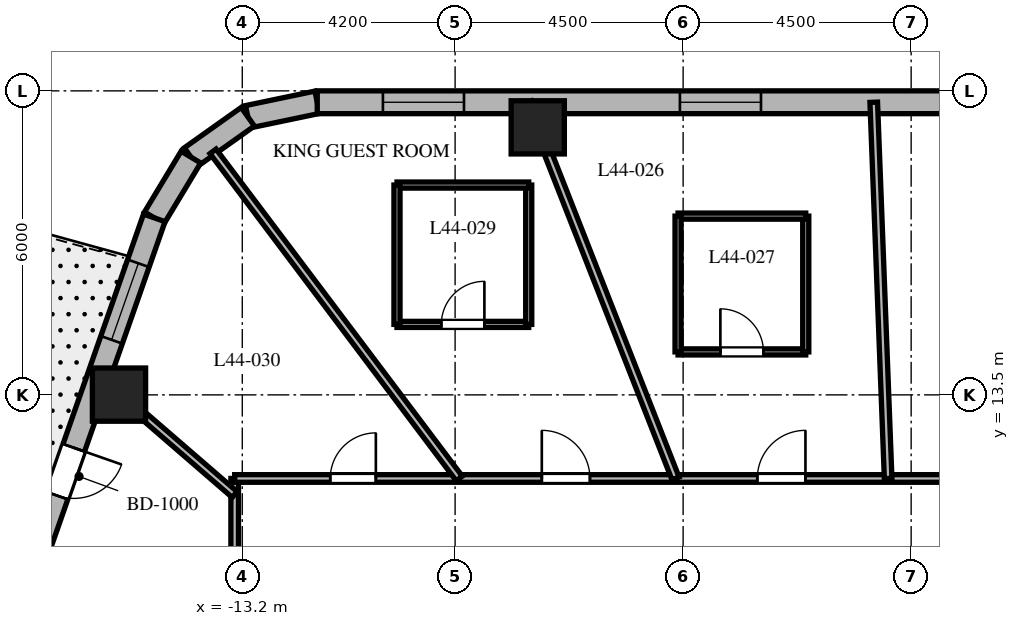
"""IFC4 building model, lengths in metres.
Left out: names, types, materials, properties, quantities, classifications, styles, units other than length and angle.
Written with IfcOpenShell. Run it as: python <this file> out.ifc"""

import sys

from ifc_helpers import new_model, si_unit, direction, frame, frame_2d, origin, origin_2d, place, context, subcontext, project, spatial, rectangle, extrude, element, fill, save


model = new_model("IFC4")
c1 = context("Model", 3, precision=1e-05, world=origin(), true_north=direction((0.0, 1.0)))
c2 = subcontext(c1, "Body", "Model", "MODEL_VIEW")
j1 = project(units=[si_unit("LENGTHUNIT", "METRE"), si_unit("PLANEANGLEUNIT", "RADIAN")], contexts=[c1])
p1 = place(None, origin())
s1 = spatial("IfcSite", under=j1, at=p1, CompositionType="ELEMENT")
p2 = place(p1, origin())
s2 = spatial("IfcBuilding", under=s1, at=p2, CompositionType="ELEMENT")
p3 = place(p2, frame((0.0, 0.0, 179.3)))
s3 = spatial("IfcBuildingStorey", under=s2, at=p3, CompositionType="ELEMENT", Elevation=179.3)
for number, where, z_axis, x_axis in (
    (1, (-7.369, 18.78, 0.0), (0.0, 0.0, 1.0), (1.0, 0.0, 0.0)),
    (2, (-15.633, 13.505, 0.0), (0.0, 0.0, 1.0), (1.0, 0.0, 0.0)),
):
    element("IfcColumn", number, at=place(p3, frame(where, z_axis=z_axis, x_axis=x_axis)), inside=s3, PredefinedType="COLUMN", context=c2, shape_type="SweptSolid", body=[
        extrude(rectangle(XDim=1.05, YDim=1.05, at=origin_2d()), origin(), (0.0, 0.0, 1.0), 3.7),
    ])
p4 = place(p3, frame((-11.72, 19.275, 0.0), z_axis=(0.0, 0.0, 1.0), x_axis=(-0.97893106758, -0.204191001093, 0.0)))
e3 = element("IfcWall", 3, at=p4, inside=s3, PredefinedType="SOLIDWALL", context=c2, shape_type="SweptSolid", body=[
    extrude(rectangle(XDim=1.4, YDim=0.45, at=frame_2d((0.7, 0.0))), origin(), (0.0, 0.0, 1.0), 3.4),
])
p5 = place(p3, frame((-13.091, 18.989, 0.0), z_axis=(0.0, 0.0, 1.0), x_axis=(-0.815574637848, -0.578651890258, 0.0)))
e4 = element("IfcWall", 4, at=p5, inside=s3, PredefinedType="SOLIDWALL", context=c2, shape_type="SweptSolid", body=[
    extrude(rectangle(XDim=1.377, YDim=0.45, at=frame_2d((0.688, 0.0))), origin(), (0.0, 0.0, 1.0), 3.4),
])
p6 = place(p3, frame((-14.214, 18.192, 0.0), z_axis=(0.0, 0.0, 1.0), x_axis=(-0.516340945502, -0.856383108193, 0.0)))
e5 = element("IfcWall", 5, at=p6, inside=s3, PredefinedType="SOLIDWALL", context=c2, shape_type="SweptSolid", body=[
    extrude(rectangle(XDim=1.4, YDim=0.45, at=frame_2d((0.7, 0.0))), origin(), (0.0, 0.0, 1.0), 3.4),
])
p7 = place(p3, frame((10.108, 19.275, 0.0), z_axis=(0.0, 0.0, 1.0), x_axis=(-1.0, 0.0, 0.0)))
e6 = element("IfcWall", 6, at=p7, inside=s3, PredefinedType="SOLIDWALL", context=c2, shape_type="SweptSolid", body=[
    extrude(rectangle(XDim=21.829, YDim=0.45, at=frame_2d((10.915, 0.0))), origin(), (0.0, 0.0, 1.0), 3.4),
])
p8 = place(p7, frame((1.297, 0.0, 0.8)))
e7 = element("IfcOpeningElement", 7, at=p8, cuts=e6, PredefinedType="OPENING", context=c2, shape_type="SweptSolid", body=[
    extrude(rectangle(XDim=1.6, YDim=1.75, at=frame_2d((0.8, 0.875))), frame((0.0, 0.235, 0.0), z_axis=(0.0, -1.0, 0.0), x_axis=(1.0, 0.0, 0.0)), (0.0, 0.0, 1.0), 0.47),
])
p9 = place(p7, frame((7.09, 0.0, 0.8)))
e8 = element("IfcOpeningElement", 8, at=p9, cuts=e6, PredefinedType="OPENING", context=c2, shape_type="SweptSolid", body=[
    extrude(rectangle(XDim=1.6, YDim=1.75, at=frame_2d((0.8, 0.875))), frame((0.0, 0.235, 0.0), z_axis=(0.0, -1.0, 0.0), x_axis=(1.0, 0.0, 0.0)), (0.0, 0.0, 1.0), 0.47),
])
p10 = place(p7, frame((13.072, 0.0, 0.8)))
e9 = element("IfcOpeningElement", 9, at=p10, cuts=e6, PredefinedType="OPENING", context=c2, shape_type="SweptSolid", body=[
    extrude(rectangle(XDim=1.6, YDim=1.75, at=frame_2d((0.8, 0.875))), frame((0.0, 0.235, 0.0), z_axis=(0.0, -1.0, 0.0), x_axis=(1.0, 0.0, 0.0)), (0.0, 0.0, 1.0), 0.47),
])
p11 = place(p7, frame((18.933, 0.0, 0.8)))
e10 = element("IfcOpeningElement", 10, at=p11, cuts=e6, PredefinedType="OPENING", context=c2, shape_type="SweptSolid", body=[
    extrude(rectangle(XDim=1.6, YDim=1.75, at=frame_2d((0.8, 0.875))), frame((0.0, 0.235, 0.0), z_axis=(0.0, -1.0, 0.0), x_axis=(1.0, 0.0, 0.0)), (0.0, 0.0, 1.0), 0.47),
])
p12 = place(p3, frame((-14.937, 16.993, 0.0), z_axis=(0.0, 0.0, 1.0), x_axis=(-0.330431575061, -0.943829949834, 0.0)))
e11 = element("IfcWall", 11, at=p12, inside=s3, PredefinedType="SOLIDWALL", context=c2, shape_type="SweptSolid", body=[
    extrude(rectangle(XDim=17.689, YDim=0.45, at=frame_2d((8.844, 0.0))), origin(), (0.0, 0.0, 1.0), 3.4),
])
p13 = place(p12, frame((4.807, 0.0, 0.0)))
e12 = element("IfcOpeningElement", 12, at=p13, cuts=e11, PredefinedType="OPENING", context=c2, shape_type="SweptSolid", body=[
    extrude(rectangle(XDim=1.0, YDim=2.15, at=frame_2d((0.5, 1.075))), frame((0.0, 0.235, 0.0), z_axis=(0.0, -1.0, 0.0), x_axis=(1.0, 0.0, 0.0)), (0.0, 0.0, 1.0), 0.47),
])
p14 = place(p12, frame((0.95, 0.0, 0.8)))
e13 = element("IfcOpeningElement", 13, at=p14, cuts=e11, PredefinedType="OPENING", context=c2, shape_type="SweptSolid", body=[
    extrude(rectangle(XDim=1.6, YDim=1.75, at=frame_2d((0.8, 0.875))), frame((0.0, 0.235, 0.0), z_axis=(0.0, -1.0, 0.0), x_axis=(1.0, 0.0, 0.0)), (0.0, 0.0, 1.0), 0.47),
])
p15 = place(p12, frame((7.99, 0.0, 0.8)))
e14 = element("IfcOpeningElement", 14, at=p15, cuts=e11, PredefinedType="OPENING", context=c2, shape_type="SweptSolid", body=[
    extrude(rectangle(XDim=1.6, YDim=1.75, at=frame_2d((0.8, 0.875))), frame((0.0, 0.235, 0.0), z_axis=(0.0, -1.0, 0.0), x_axis=(1.0, 0.0, 0.0)), (0.0, 0.0, 1.0), 0.47),
])
p16 = place(p12, frame((15.084, 0.0, 0.8)))
e15 = element("IfcOpeningElement", 15, at=p16, cuts=e11, PredefinedType="OPENING", context=c2, shape_type="SweptSolid", body=[
    extrude(rectangle(XDim=1.6, YDim=1.75, at=frame_2d((0.8, 0.875))), frame((0.0, 0.235, 0.0), z_axis=(0.0, -1.0, 0.0), x_axis=(1.0, 0.0, 0.0)), (0.0, 0.0, 1.0), 0.47),
])
p17 = place(p3, frame((-13.35, -11.85, 0.0), z_axis=(0.0, 0.0, 1.0), x_axis=(0.0, 1.0, 0.0)))
e16 = element("IfcWall", 16, at=p17, inside=s3, PredefinedType="PARTITIONING", context=c2, shape_type="SweptSolid", body=[
    extrude(rectangle(XDim=23.7, YDim=0.15, at=frame_2d((11.85, 0.0))), origin(), (0.0, 0.0, 1.0), 2.84),
])
p18 = place(p17, frame((18.389, 0.0, 0.0)))
e17 = element("IfcOpeningElement", 17, at=p18, cuts=e16, PredefinedType="OPENING", context=c2, shape_type="SweptSolid", body=[
    extrude(rectangle(XDim=0.95, YDim=2.03, at=frame_2d((0.475, 1.015))), frame((0.0, 0.085, 0.0), z_axis=(0.0, -1.0, 0.0), x_axis=(1.0, 0.0, 0.0)), (0.0, 0.0, 1.0), 0.17),
])
p19 = place(p17, frame((12.315, 0.0, 0.0)))
e18 = element("IfcOpeningElement", 18, at=p19, cuts=e16, PredefinedType="OPENING", context=c2, shape_type="SweptSolid", body=[
    extrude(rectangle(XDim=0.9, YDim=2.03, at=frame_2d((0.45, 1.015))), frame((0.0, 0.085, 0.0), z_axis=(0.0, -1.0, 0.0), x_axis=(1.0, 0.0, 0.0)), (0.0, 0.0, 1.0), 0.17),
])
p20 = place(p17, frame((9.27, 0.0, 0.0)))
e19 = element("IfcOpeningElement", 19, at=p20, cuts=e16, PredefinedType="OPENING", context=c2, shape_type="SweptSolid", body=[
    extrude(rectangle(XDim=0.9, YDim=2.03, at=frame_2d((0.45, 1.015))), frame((0.0, 0.085, 0.0), z_axis=(0.0, -1.0, 0.0), x_axis=(1.0, 0.0, 0.0)), (0.0, 0.0, 1.0), 0.17),
])
p21 = place(p17, frame((3.765, 0.0, 0.0)))
e20 = element("IfcOpeningElement", 20, at=p21, cuts=e16, PredefinedType="OPENING", context=c2, shape_type="SweptSolid", body=[
    extrude(rectangle(XDim=0.9, YDim=2.03, at=frame_2d((0.45, 1.015))), frame((0.0, 0.085, 0.0), z_axis=(0.0, -1.0, 0.0), x_axis=(1.0, 0.0, 0.0)), (0.0, 0.0, 1.0), 0.17),
])
p22 = place(p3, frame((-13.35, 11.85, 0.0), z_axis=(0.0, 0.0, 1.0), x_axis=(1.0, 0.0, 0.0)))
e21 = element("IfcWall", 21, at=p22, inside=s3, PredefinedType="PARTITIONING", context=c2, shape_type="SweptSolid", body=[
    extrude(rectangle(XDim=26.7, YDim=0.15, at=frame_2d((13.35, 0.0))), origin(), (0.0, 0.0, 1.0), 2.84),
])
p23 = place(p22, frame((22.7, 0.0, 0.0)))
e22 = element("IfcOpeningElement", 22, at=p23, cuts=e21, PredefinedType="OPENING", context=c2, shape_type="SweptSolid", body=[
    extrude(rectangle(XDim=0.9, YDim=2.03, at=frame_2d((0.45, 1.015))), frame((0.0, 0.085, 0.0), z_axis=(0.0, -1.0, 0.0), x_axis=(1.0, 0.0, 0.0)), (0.0, 0.0, 1.0), 0.17),
])
p24 = place(p22, frame((18.523, 0.0, 0.0)))
e23 = element("IfcOpeningElement", 23, at=p24, cuts=e21, PredefinedType="OPENING", context=c2, shape_type="SweptSolid", body=[
    extrude(rectangle(XDim=0.95, YDim=2.03, at=frame_2d((0.475, 1.015))), frame((0.0, 0.085, 0.0), z_axis=(0.0, -1.0, 0.0), x_axis=(1.0, 0.0, 0.0)), (0.0, 0.0, 1.0), 0.17),
])
p25 = place(p22, frame((14.469, 0.0, 0.0)))
e24 = element("IfcOpeningElement", 24, at=p25, cuts=e21, PredefinedType="OPENING", context=c2, shape_type="SweptSolid", body=[
    extrude(rectangle(XDim=0.95, YDim=2.03, at=frame_2d((0.475, 1.015))), frame((0.0, 0.085, 0.0), z_axis=(0.0, -1.0, 0.0), x_axis=(1.0, 0.0, 0.0)), (0.0, 0.0, 1.0), 0.17),
])
p26 = place(p22, frame((10.314, 0.0, 0.0)))
e25 = element("IfcOpeningElement", 25, at=p26, cuts=e21, PredefinedType="OPENING", context=c2, shape_type="SweptSolid", body=[
    extrude(rectangle(XDim=0.95, YDim=2.03, at=frame_2d((0.475, 1.015))), frame((0.0, 0.085, 0.0), z_axis=(0.0, -1.0, 0.0), x_axis=(1.0, 0.0, 0.0)), (0.0, 0.0, 1.0), 0.17),
])
p27 = place(p22, frame((6.061, 0.0, 0.0)))
e26 = element("IfcOpeningElement", 26, at=p27, cuts=e21, PredefinedType="OPENING", context=c2, shape_type="SweptSolid", body=[
    extrude(rectangle(XDim=0.95, YDim=2.03, at=frame_2d((0.475, 1.015))), frame((0.0, 0.085, 0.0), z_axis=(0.0, -1.0, 0.0), x_axis=(1.0, 0.0, 0.0)), (0.0, 0.0, 1.0), 0.17),
])
p28 = place(p22, frame((1.886, 0.0, 0.0)))
e27 = element("IfcOpeningElement", 27, at=p28, cuts=e21, PredefinedType="OPENING", context=c2, shape_type="SweptSolid", body=[
    extrude(rectangle(XDim=0.9, YDim=2.03, at=frame_2d((0.45, 1.015))), frame((0.0, 0.085, 0.0), z_axis=(0.0, -1.0, 0.0), x_axis=(1.0, 0.0, 0.0)), (0.0, 0.0, 1.0), 0.17),
])
p29 = place(p3, frame((-0.454, 11.85, 0.0), z_axis=(0.0, 0.0, 1.0), x_axis=(-0.038279171143, 0.999267083945, 0.0)))
e28 = element("IfcWall", 28, at=p29, inside=s3, PredefinedType="PARTITIONING", context=c2, shape_type="SweptSolid", body=[
    extrude(rectangle(XDim=7.43, YDim=0.15, at=frame_2d((3.715, 0.0))), origin(), (0.0, 0.0, 1.0), 2.64),
])
p30 = place(p3, frame((-4.65, 11.85, 0.0), z_axis=(0.0, 0.0, 1.0), x_axis=(-0.365265947993, 0.930903210456, 0.0)))
e29 = element("IfcWall", 29, at=p30, inside=s3, PredefinedType="PARTITIONING", context=c2, shape_type="SweptSolid", body=[
    extrude(rectangle(XDim=7.976, YDim=0.15, at=frame_2d((3.988, 0.0))), origin(), (0.0, 0.0, 1.0), 2.64),
])
p31 = place(p3, frame((-8.918, 11.85, 0.0), z_axis=(0.0, 0.0, 1.0), x_axis=(-0.601347965064, 0.798987249531, 0.0)))
e30 = element("IfcWall", 30, at=p31, inside=s3, PredefinedType="PARTITIONING", context=c2, shape_type="SweptSolid", body=[
    extrude(rectangle(XDim=8.08, YDim=0.15, at=frame_2d((4.04, 0.0))), origin(), (0.0, 0.0, 1.0), 2.64),
])
p32 = place(p3, frame((-13.35, 11.533, 0.0), z_axis=(0.0, 0.0, 1.0), x_axis=(-0.756711647314, 0.65374879183, 0.0)))
e31 = element("IfcWall", 31, at=p32, inside=s3, PredefinedType="PARTITIONING", context=c2, shape_type="SweptSolid", body=[
    extrude(rectangle(XDim=3.55, YDim=0.15, at=frame_2d((1.775, 0.0))), origin(), (0.0, 0.0, 1.0), 2.64),
])
p33 = place(p3, frame((-4.6, 14.348, 0.0), z_axis=(0.0, 0.0, 1.0), x_axis=(1.0, 0.0, 0.0)))
e32 = element("IfcWall", 32, at=p33, inside=s3, PredefinedType="PARTITIONING", context=c2, shape_type="SweptSolid", body=[
    extrude(rectangle(XDim=2.52, YDim=0.12, at=frame_2d((1.26, 0.0))), origin(), (0.0, 0.0, 1.0), 3.4),
])
p34 = place(p33, frame((0.835, 0.0, 0.0)))
e33 = element("IfcOpeningElement", 33, at=p34, cuts=e32, PredefinedType="OPENING", context=c2, shape_type="SweptSolid", body=[
    extrude(rectangle(XDim=0.85, YDim=2.03, at=frame_2d((0.425, 1.015))), frame((0.0, 0.07, 0.0), z_axis=(0.0, -1.0, 0.0), x_axis=(1.0, 0.0, 0.0)), (0.0, 0.0, 1.0), 0.14),
])
p35 = place(p3, frame((-2.08, 14.348, 0.0), z_axis=(0.0, 0.0, 1.0), x_axis=(0.0, 1.0, 0.0)))
e34 = element("IfcWall", 34, at=p35, inside=s3, PredefinedType="PARTITIONING", context=c2, shape_type="SweptSolid", body=[
    extrude(rectangle(XDim=2.68, YDim=0.12, at=frame_2d((1.34, 0.0))), origin(), (0.0, 0.0, 1.0), 2.84),
])
p36 = place(p3, frame((-2.08, 17.028, 0.0), z_axis=(0.0, 0.0, 1.0), x_axis=(-1.0, 0.0, 0.0)))
e35 = element("IfcWall", 35, at=p36, inside=s3, PredefinedType="PARTITIONING", context=c2, shape_type="SweptSolid", body=[
    extrude(rectangle(XDim=2.52, YDim=0.12, at=frame_2d((1.26, 0.0))), origin(), (0.0, 0.0, 1.0), 3.4),
])
p37 = place(p3, frame((-4.6, 17.028, 0.0), z_axis=(0.0, 0.0, 1.0), x_axis=(0.0, -1.0, 0.0)))
e36 = element("IfcWall", 36, at=p37, inside=s3, PredefinedType="PARTITIONING", context=c2, shape_type="SweptSolid", body=[
    extrude(rectangle(XDim=2.68, YDim=0.12, at=frame_2d((1.34, 0.0))), origin(), (0.0, 0.0, 1.0), 2.84),
])
p38 = place(p3, frame((-10.147, 14.891, 0.0), z_axis=(0.0, 0.0, 1.0), x_axis=(1.0, 0.0, 0.0)))
e37 = element("IfcWall", 37, at=p38, inside=s3, PredefinedType="PARTITIONING", context=c2, shape_type="SweptSolid", body=[
    extrude(rectangle(XDim=2.6, YDim=0.12, at=frame_2d((1.3, 0.0))), origin(), (0.0, 0.0, 1.0), 2.84),
])
p39 = place(p38, frame((0.875, 0.0, 0.0)))
e38 = element("IfcOpeningElement", 38, at=p39, cuts=e37, PredefinedType="OPENING", context=c2, shape_type="SweptSolid", body=[
    extrude(rectangle(XDim=0.85, YDim=2.03, at=frame_2d((0.425, 1.015))), frame((0.0, 0.07, 0.0), z_axis=(0.0, -1.0, 0.0), x_axis=(1.0, 0.0, 0.0)), (0.0, 0.0, 1.0), 0.14),
])
p40 = place(p3, frame((-7.547, 14.891, 0.0), z_axis=(0.0, 0.0, 1.0), x_axis=(0.0, 1.0, 0.0)))
e39 = element("IfcWall", 39, at=p40, inside=s3, PredefinedType="PARTITIONING", context=c2, shape_type="SweptSolid", body=[
    extrude(rectangle(XDim=2.75, YDim=0.12, at=frame_2d((1.375, 0.0))), origin(), (0.0, 0.0, 1.0), 2.84),
])
p41 = place(p3, frame((-7.547, 17.641, 0.0), z_axis=(0.0, 0.0, 1.0), x_axis=(-1.0, 0.0, 0.0)))
e40 = element("IfcWall", 40, at=p41, inside=s3, PredefinedType="PARTITIONING", context=c2, shape_type="SweptSolid", body=[
    extrude(rectangle(XDim=2.6, YDim=0.12, at=frame_2d((1.3, 0.0))), origin(), (0.0, 0.0, 1.0), 2.64),
])
p42 = place(p3, frame((-10.147, 17.641, 0.0), z_axis=(0.0, 0.0, 1.0), x_axis=(0.0, -1.0, 0.0)))
e41 = element("IfcWall", 41, at=p42, inside=s3, PredefinedType="PARTITIONING", context=c2, shape_type="SweptSolid", body=[
    extrude(rectangle(XDim=2.75, YDim=0.12, at=frame_2d((1.375, 0.0))), origin(), (0.0, 0.0, 1.0), 2.64),
])
p43 = place(p10, origin())
e42 = element("IfcWindow", 42, at=p43, inside=s3, PartitioningType="SINGLE_PANEL", PredefinedType="WINDOW", context=c2, shape_type="SweptSolid", body=[
    extrude(rectangle(XDim=1.6, YDim=1.75, at=frame_2d((0.8, 0.875))), frame((0.0, 0.03, 0.0), z_axis=(0.0, -1.0, 0.0), x_axis=(1.0, 0.0, 0.0)), (0.0, 0.0, 1.0), 0.06),
])
fill(e9, e42)
p44 = place(p11, origin())
e43 = element("IfcWindow", 43, at=p44, inside=s3, PartitioningType="SINGLE_PANEL", PredefinedType="WINDOW", context=c2, shape_type="SweptSolid", body=[
    extrude(rectangle(XDim=1.6, YDim=1.75, at=frame_2d((0.8, 0.875))), frame((0.0, 0.03, 0.0), z_axis=(0.0, -1.0, 0.0), x_axis=(1.0, 0.0, 0.0)), (0.0, 0.0, 1.0), 0.06),
])
fill(e10, e43)
p45 = place(p13, origin())
e44 = element("IfcDoor", 44, at=p45, inside=s3, OperationType="SINGLE_SWING_LEFT", PredefinedType="DOOR", context=c2, shape_type="SweptSolid", body=[
    extrude(rectangle(XDim=1.0, YDim=2.15, at=frame_2d((0.5, 1.075))), frame((0.0, 0.025, 0.0), z_axis=(0.0, -1.0, 0.0), x_axis=(1.0, 0.0, 0.0)), (0.0, 0.0, 1.0), 0.05),
])
fill(e12, e44)
p46 = place(p14, origin())
e45 = element("IfcWindow", 45, at=p46, inside=s3, PartitioningType="SINGLE_PANEL", PredefinedType="WINDOW", context=c2, shape_type="SweptSolid", body=[
    extrude(rectangle(XDim=1.6, YDim=1.75, at=frame_2d((0.8, 0.875))), frame((0.0, 0.03, 0.0), z_axis=(0.0, -1.0, 0.0), x_axis=(1.0, 0.0, 0.0)), (0.0, 0.0, 1.0), 0.06),
])
fill(e13, e45)
p47 = place(p26, origin())
e46 = element("IfcDoor", 46, at=p47, inside=s3, OperationType="SINGLE_SWING_RIGHT", PredefinedType="DOOR", context=c2, shape_type="SweptSolid", body=[
    extrude(rectangle(XDim=0.95, YDim=2.03, at=frame_2d((0.475, 1.015))), frame((0.0, 0.025, 0.0), z_axis=(0.0, -1.0, 0.0), x_axis=(1.0, 0.0, 0.0)), (0.0, 0.0, 1.0), 0.05),
])
fill(e25, e46)
p48 = place(p34, origin())
e47 = element("IfcDoor", 47, at=p48, inside=s3, OperationType="SINGLE_SWING_LEFT", PredefinedType="DOOR", context=c2, shape_type="SweptSolid", body=[
    extrude(rectangle(XDim=0.85, YDim=2.03, at=frame_2d((0.425, 1.015))), frame((0.0, 0.025, 0.0), z_axis=(0.0, -1.0, 0.0), x_axis=(1.0, 0.0, 0.0)), (0.0, 0.0, 1.0), 0.05),
])
fill(e33, e47)
p49 = place(p27, origin())
e48 = element("IfcDoor", 48, at=p49, inside=s3, OperationType="SINGLE_SWING_LEFT", PredefinedType="DOOR", context=c2, shape_type="SweptSolid", body=[
    extrude(rectangle(XDim=0.95, YDim=2.03, at=frame_2d((0.475, 1.015))), frame((0.0, 0.025, 0.0), z_axis=(0.0, -1.0, 0.0), x_axis=(1.0, 0.0, 0.0)), (0.0, 0.0, 1.0), 0.05),
])
fill(e26, e48)
p50 = place(p39, origin())
e49 = element("IfcDoor", 49, at=p50, inside=s3, OperationType="SINGLE_SWING_RIGHT", PredefinedType="DOOR", context=c2, shape_type="SweptSolid", body=[
    extrude(rectangle(XDim=0.85, YDim=2.03, at=frame_2d((0.425, 1.015))), frame((0.0, 0.025, 0.0), z_axis=(0.0, -1.0, 0.0), x_axis=(1.0, 0.0, 0.0)), (0.0, 0.0, 1.0), 0.05),
])
fill(e38, e49)
p51 = place(p28, origin())
e50 = element("IfcDoor", 50, at=p51, inside=s3, OperationType="SINGLE_SWING_RIGHT", PredefinedType="DOOR", context=c2, shape_type="SweptSolid", body=[
    extrude(rectangle(XDim=0.9, YDim=2.03, at=frame_2d((0.45, 1.015))), frame((0.0, 0.025, 0.0), z_axis=(0.0, -1.0, 0.0), x_axis=(1.0, 0.0, 0.0)), (0.0, 0.0, 1.0), 0.05),
])
fill(e27, e50)
save(model, sys.argv[1])
